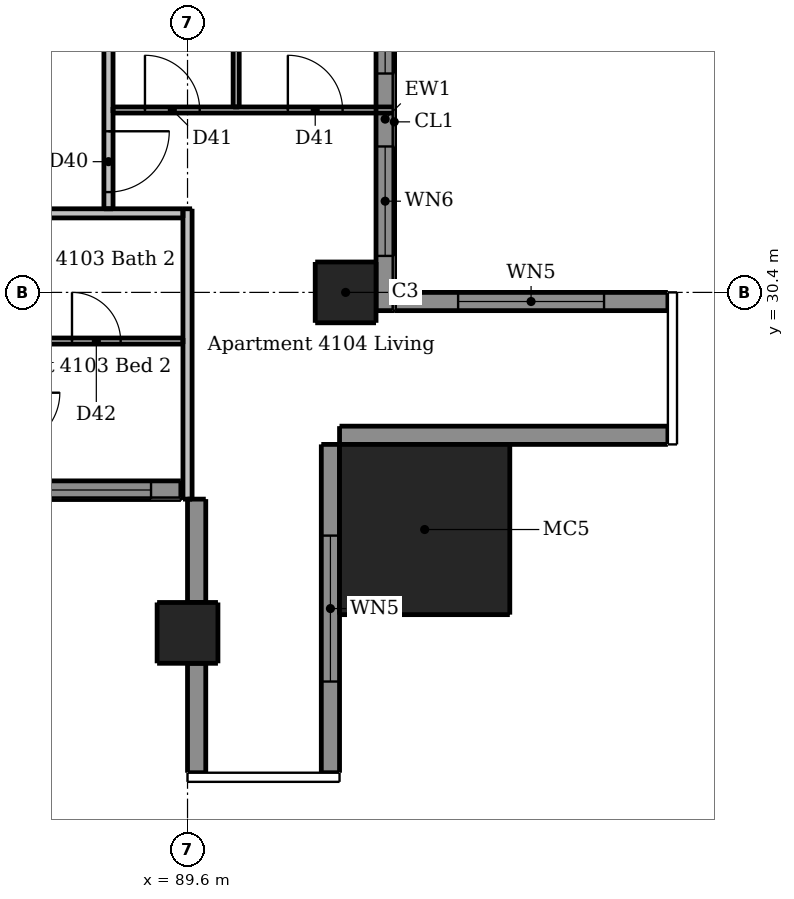
"""IFC4 building model, lengths in metres.
Left out: names, types, materials, properties, quantities, classifications, styles, units other than length and angle.
Written with IfcOpenShell. Run it as: python <this file> out.ifc"""

import sys

from ifc_helpers import new_model, si_unit, direction, frame, frame_2d, origin, origin_2d, place, context, subcontext, project, spatial, rectangle, extrude, element, fill, save


model = new_model("IFC4")
c1 = context("Model", 3, precision=1e-05, world=origin(), true_north=direction((0.0, 1.0)))
c2 = subcontext(c1, "Body", "Model", "MODEL_VIEW")
j1 = project(units=[si_unit("LENGTHUNIT", "METRE"), si_unit("PLANEANGLEUNIT", "RADIAN")], contexts=[c1])
p1 = place(None, origin())
s1 = spatial("IfcSite", under=j1, at=p1, CompositionType="ELEMENT")
p2 = place(p1, origin())
s2 = spatial("IfcBuilding", under=s1, at=p2, CompositionType="ELEMENT")
p3 = place(p2, frame((0.0, 0.0, 154.9)))
s3 = spatial("IfcBuildingStorey", under=s2, at=p3, CompositionType="ELEMENT", Elevation=154.9)
for number, where, z_axis, x_axis in (
    (1, (89.6, 24.8, 0.0), (0.0, 0.0, 1.0), (1.0, 0.0, 0.0)),
    (2, (92.2, 30.4, 0.0), (0.0, 0.0, 1.0), (1.0, 0.0, 0.0)),
):
    element("IfcColumn", number, at=place(p3, frame(where, z_axis=z_axis, x_axis=x_axis)), inside=s3, PredefinedType="COLUMN", context=c2, shape_type="SweptSolid", body=[
        extrude(rectangle(XDim=1.0, YDim=1.0, at=origin_2d()), origin(), (0.0, 0.0, 1.0), 3.05),
    ])
p4 = place(p3, frame((93.5, 26.5, 0.0), z_axis=(0.0, 0.0, 1.0), x_axis=(1.0, 0.0, 0.0)))
e3 = element("IfcColumn", 3, at=p4, inside=s3, PredefinedType="COLUMN", context=c2, shape_type="SweptSolid", body=[
    extrude(rectangle(XDim=2.8, YDim=2.8, at=origin_2d()), origin(), (0.0, 0.0, 1.0), 3.3),
])
p5 = place(p3, frame((89.75, 27.0, 0.0), z_axis=(0.0, 0.0, 1.0), x_axis=(0.0, -1.0, 0.0)))
e4 = element("IfcWall", 4, at=p5, inside=s3, PredefinedType="SOLIDWALL", context=c2, shape_type="SweptSolid", body=[
    extrude(rectangle(XDim=1.7, YDim=0.3, at=frame_2d((0.85, 0.0))), origin(), (0.0, 0.0, 1.0), 3.05),
])
p6 = place(p3, frame((89.75, 24.3, 0.0), z_axis=(0.0, 0.0, 1.0), x_axis=(0.0, -1.0, 0.0)))
e5 = element("IfcWall", 5, at=p6, inside=s3, PredefinedType="SOLIDWALL", context=c2, shape_type="SweptSolid", body=[
    extrude(rectangle(XDim=1.8, YDim=0.3, at=frame_2d((0.9, 0.0))), origin(), (0.0, 0.0, 1.0), 3.05),
])
p7 = place(p3, frame((91.95, 22.5, 0.0), z_axis=(0.0, 0.0, 1.0), x_axis=(0.0, 1.0, 0.0)))
e6 = element("IfcWall", 6, at=p7, inside=s3, PredefinedType="SOLIDWALL", context=c2, shape_type="SweptSolid", body=[
    extrude(rectangle(XDim=5.4, YDim=0.3, at=frame_2d((2.7, 0.0))), origin(), (0.0, 0.0, 1.0), 3.05),
])
p8 = place(p7, frame((1.5, 0.0, 0.15)))
e7 = element("IfcOpeningElement", 7, at=p8, cuts=e6, PredefinedType="OPENING", context=c2, shape_type="SweptSolid", body=[
    extrude(rectangle(XDim=2.4, YDim=2.1, at=frame_2d((1.2, 1.05))), frame((0.0, 0.16, 0.0), z_axis=(0.0, -1.0, 0.0), x_axis=(1.0, 0.0, 0.0)), (0.0, 0.0, 1.0), 0.32),
])
p9 = place(p3, frame((92.1, 28.05, 0.0), z_axis=(0.0, 0.0, 1.0), x_axis=(1.0, 0.0, 0.0)))
e8 = element("IfcWall", 8, at=p9, inside=s3, PredefinedType="SOLIDWALL", context=c2, shape_type="SweptSolid", body=[
    extrude(rectangle(XDim=5.4, YDim=0.3, at=frame_2d((2.7, 0.0))), origin(), (0.0, 0.0, 1.0), 3.05),
])
p10 = place(p3, frame((97.5, 30.25, 0.0), z_axis=(0.0, 0.0, 1.0), x_axis=(-1.0, 0.0, 0.0)))
e9 = element("IfcWall", 9, at=p10, inside=s3, PredefinedType="SOLIDWALL", context=c2, shape_type="SweptSolid", body=[
    extrude(rectangle(XDim=4.5, YDim=0.3, at=frame_2d((2.25, 0.0))), origin(), (0.0, 0.0, 1.0), 3.05),
])
p11 = place(p10, frame((1.05, 0.0, 0.15)))
e10 = element("IfcOpeningElement", 10, at=p11, cuts=e9, PredefinedType="OPENING", context=c2, shape_type="SweptSolid", body=[
    extrude(rectangle(XDim=2.4, YDim=2.1, at=frame_2d((1.2, 1.05))), frame((0.0, 0.16, 0.0), z_axis=(0.0, -1.0, 0.0), x_axis=(1.0, 0.0, 0.0)), (0.0, 0.0, 1.0), 0.32),
])
p12 = place(p3, frame((83.7, 27.15, 0.0), z_axis=(0.0, 0.0, 1.0), x_axis=(1.0, 0.0, 0.0)))
e11 = element("IfcWall", 11, at=p12, inside=s3, PredefinedType="SOLIDWALL", context=c2, shape_type="SweptSolid", body=[
    extrude(rectangle(XDim=5.79, YDim=0.3, at=frame_2d((2.895, 0.0))), origin(), (0.0, 0.0, 1.0), 3.05),
])
p13 = place(p12, frame((0.5, 0.0, 0.15)))
e12 = element("IfcOpeningElement", 12, at=p13, cuts=e11, PredefinedType="OPENING", context=c2, shape_type="SweptSolid", body=[
    extrude(rectangle(XDim=1.8, YDim=2.1, at=frame_2d((0.9, 1.05))), frame((0.0, 0.16, 0.0), z_axis=(0.0, -1.0, 0.0), x_axis=(1.0, 0.0, 0.0)), (0.0, 0.0, 1.0), 0.32),
])
p14 = place(p12, frame((3.5, 0.0, 0.15)))
e13 = element("IfcOpeningElement", 13, at=p14, cuts=e11, PredefinedType="OPENING", context=c2, shape_type="SweptSolid", body=[
    extrude(rectangle(XDim=1.8, YDim=2.1, at=frame_2d((0.9, 1.05))), frame((0.0, 0.16, 0.0), z_axis=(0.0, -1.0, 0.0), x_axis=(1.0, 0.0, 0.0)), (0.0, 0.0, 1.0), 0.32),
])
p15 = place(p3, frame((92.85, 30.1, 0.0), z_axis=(0.0, 0.0, 1.0), x_axis=(0.0, 1.0, 0.0)))
e14 = element("IfcWall", 14, at=p15, inside=s3, PredefinedType="SOLIDWALL", context=c2, shape_type="SweptSolid", body=[
    extrude(rectangle(XDim=6.3, YDim=0.3, at=frame_2d((3.15, 0.0))), origin(), (0.0, 0.0, 1.0), 3.05),
])
p16 = place(p15, frame((0.9, 0.0, 0.15)))
e15 = element("IfcOpeningElement", 15, at=p16, cuts=e14, PredefinedType="OPENING", context=c2, shape_type="SweptSolid", body=[
    extrude(rectangle(XDim=1.8, YDim=2.1, at=frame_2d((0.9, 1.05))), frame((0.0, 0.16, 0.0), z_axis=(0.0, -1.0, 0.0), x_axis=(1.0, 0.0, 0.0)), (0.0, 0.0, 1.0), 0.32),
])
p17 = place(p15, frame((3.9, 0.0, 0.15)))
e16 = element("IfcOpeningElement", 16, at=p17, cuts=e14, PredefinedType="OPENING", context=c2, shape_type="SweptSolid", body=[
    extrude(rectangle(XDim=1.8, YDim=2.1, at=frame_2d((0.9, 1.05))), frame((0.0, 0.16, 0.0), z_axis=(0.0, -1.0, 0.0), x_axis=(1.0, 0.0, 0.0)), (0.0, 0.0, 1.0), 0.32),
])
p18 = place(p3, frame((90.4, 33.45, 0.0), z_axis=(0.0, 0.0, 1.0), x_axis=(0.0, 1.0, 0.0)))
e17 = element("IfcWall", 17, at=p18, inside=s3, PredefinedType="PARTITIONING", context=c2, shape_type="SweptSolid", body=[
    extrude(rectangle(XDim=8.1, YDim=0.1, at=frame_2d((4.05, 0.0))), origin(), (0.0, 0.0, 1.0), 3.05),
])
p19 = place(p18, frame((3.75, 0.0, 0.0)))
e18 = element("IfcOpeningElement", 18, at=p19, cuts=e17, PredefinedType="OPENING", context=c2, shape_type="SweptSolid", body=[
    extrude(rectangle(XDim=0.8, YDim=2.1, at=frame_2d((0.4, 1.05))), frame((0.0, 0.06, 0.0), z_axis=(0.0, -1.0, 0.0), x_axis=(1.0, 0.0, 0.0)), (0.0, 0.0, 1.0), 0.12),
])
p20 = place(p18, frame((6.55, 0.0, 0.0)))
e19 = element("IfcOpeningElement", 19, at=p20, cuts=e17, PredefinedType="OPENING", context=c2, shape_type="SweptSolid", body=[
    extrude(rectangle(XDim=0.9, YDim=2.1, at=frame_2d((0.45, 1.05))), frame((0.0, 0.06, 0.0), z_axis=(0.0, -1.0, 0.0), x_axis=(1.0, 0.0, 0.0)), (0.0, 0.0, 1.0), 0.12),
])
p21 = place(p3, frame((88.375, 33.4, 0.0), z_axis=(0.0, 0.0, 1.0), x_axis=(1.0, 0.0, 0.0)))
e20 = element("IfcWall", 20, at=p21, inside=s3, PredefinedType="PARTITIONING", context=c2, shape_type="SweptSolid", body=[
    extrude(rectangle(XDim=4.625, YDim=0.1, at=frame_2d((2.312, 0.0))), origin(), (0.0, 0.0, 1.0), 3.05),
])
p22 = place(p21, frame((0.525, 0.0, 0.0)))
e21 = element("IfcOpeningElement", 21, at=p22, cuts=e20, PredefinedType="OPENING", context=c2, shape_type="SweptSolid", body=[
    extrude(rectangle(XDim=0.9, YDim=2.1, at=frame_2d((0.45, 1.05))), frame((0.0, 0.06, 0.0), z_axis=(0.0, -1.0, 0.0), x_axis=(1.0, 0.0, 0.0)), (0.0, 0.0, 1.0), 0.12),
])
p23 = place(p21, frame((2.875, 0.0, 0.0)))
e22 = element("IfcOpeningElement", 22, at=p23, cuts=e20, PredefinedType="OPENING", context=c2, shape_type="SweptSolid", body=[
    extrude(rectangle(XDim=0.9, YDim=2.1, at=frame_2d((0.45, 1.05))), frame((0.0, 0.06, 0.0), z_axis=(0.0, -1.0, 0.0), x_axis=(1.0, 0.0, 0.0)), (0.0, 0.0, 1.0), 0.12),
])
p24 = place(p3, frame((84.25, 29.6, 0.0), z_axis=(0.0, 0.0, 1.0), x_axis=(1.0, 0.0, 0.0)))
e23 = element("IfcWall", 23, at=p24, inside=s3, PredefinedType="PARTITIONING", context=c2, shape_type="SweptSolid", body=[
    extrude(rectangle(XDim=5.275, YDim=0.1, at=frame_2d((2.637, 0.0))), origin(), (0.0, 0.0, 1.0), 3.05),
])
p25 = place(p24, frame((0.7, 0.0, 0.0)))
e24 = element("IfcOpeningElement", 24, at=p25, cuts=e23, PredefinedType="OPENING", context=c2, shape_type="SweptSolid", body=[
    extrude(rectangle(XDim=0.9, YDim=2.1, at=frame_2d((0.45, 1.05))), frame((0.0, 0.06, 0.0), z_axis=(0.0, -1.0, 0.0), x_axis=(1.0, 0.0, 0.0)), (0.0, 0.0, 1.0), 0.12),
])
p26 = place(p24, frame((3.45, 0.0, 0.0)))
e25 = element("IfcOpeningElement", 25, at=p26, cuts=e23, PredefinedType="OPENING", context=c2, shape_type="SweptSolid", body=[
    extrude(rectangle(XDim=0.8, YDim=2.1, at=frame_2d((0.4, 1.05))), frame((0.0, 0.06, 0.0), z_axis=(0.0, -1.0, 0.0), x_axis=(1.0, 0.0, 0.0)), (0.0, 0.0, 1.0), 0.12),
])
p27 = place(p3, frame((88.3, 61.175, 0.0), z_axis=(0.0, 0.0, 1.0), x_axis=(0.0, -1.0, 0.0)))
e26 = element("IfcWall", 26, at=p27, inside=s3, PredefinedType="PARTITIONING", context=c2, shape_type="SweptSolid", body=[
    extrude(rectangle(XDim=29.4, YDim=0.15, at=frame_2d((14.7, 0.0))), origin(), (0.0, 0.0, 1.0), 3.05),
])
p28 = place(p27, frame((28.125, 0.0, 0.0)))
e27 = element("IfcOpeningElement", 27, at=p28, cuts=e26, PredefinedType="OPENING", context=c2, shape_type="SweptSolid", body=[
    extrude(rectangle(XDim=1.0, YDim=2.1, at=frame_2d((0.5, 1.05))), frame((0.0, 0.085, 0.0), z_axis=(0.0, -1.0, 0.0), x_axis=(1.0, 0.0, 0.0)), (0.0, 0.0, 1.0), 0.17),
])
p29 = place(p27, frame((18.275, 0.0, 0.0)))
e28 = element("IfcOpeningElement", 28, at=p29, cuts=e26, PredefinedType="OPENING", context=c2, shape_type="SweptSolid", body=[
    extrude(rectangle(XDim=1.0, YDim=2.1, at=frame_2d((0.5, 1.05))), frame((0.0, 0.085, 0.0), z_axis=(0.0, -1.0, 0.0), x_axis=(1.0, 0.0, 0.0)), (0.0, 0.0, 1.0), 0.17),
])
p30 = place(p27, frame((10.475, 0.0, 0.0)))
e29 = element("IfcOpeningElement", 29, at=p30, cuts=e26, PredefinedType="OPENING", context=c2, shape_type="SweptSolid", body=[
    extrude(rectangle(XDim=1.0, YDim=2.1, at=frame_2d((0.5, 1.05))), frame((0.0, 0.085, 0.0), z_axis=(0.0, -1.0, 0.0), x_axis=(1.0, 0.0, 0.0)), (0.0, 0.0, 1.0), 0.17),
])
p31 = place(p27, frame((3.275, 0.0, 0.0)))
e30 = element("IfcOpeningElement", 30, at=p31, cuts=e26, PredefinedType="OPENING", context=c2, shape_type="SweptSolid", body=[
    extrude(rectangle(XDim=1.0, YDim=2.1, at=frame_2d((0.5, 1.05))), frame((0.0, 0.085, 0.0), z_axis=(0.0, -1.0, 0.0), x_axis=(1.0, 0.0, 0.0)), (0.0, 0.0, 1.0), 0.17),
])
p32 = place(p3, frame((89.6, 27.0, 0.0), z_axis=(0.0, 0.0, 1.0), x_axis=(0.0, 1.0, 0.0)))
e31 = element("IfcWall", 31, at=p32, inside=s3, PredefinedType="PARTITIONING", context=c2, shape_type="SweptSolid", body=[
    extrude(rectangle(XDim=4.775, YDim=0.15, at=frame_2d((2.387, 0.0))), origin(), (0.0, 0.0, 1.0), 2.51),
])
p33 = place(p3, frame((89.525, 31.7, 0.0), z_axis=(0.0, 0.0, 1.0), x_axis=(-1.0, 0.0, 0.0)))
e32 = element("IfcWall", 32, at=p33, inside=s3, PredefinedType="PARTITIONING", context=c2, shape_type="SweptSolid", body=[
    extrude(rectangle(XDim=30.55, YDim=0.15, at=frame_2d((15.275, 0.0))), origin(), (0.0, 0.0, 1.0), 3.05),
])
p34 = place(p33, frame((26.775, 0.0, 0.0)))
e33 = element("IfcOpeningElement", 33, at=p34, cuts=e32, PredefinedType="OPENING", context=c2, shape_type="SweptSolid", body=[
    extrude(rectangle(XDim=1.0, YDim=2.1, at=frame_2d((0.5, 1.05))), frame((0.0, 0.085, 0.0), z_axis=(0.0, -1.0, 0.0), x_axis=(1.0, 0.0, 0.0)), (0.0, 0.0, 1.0), 0.17),
])
p35 = place(p33, frame((14.425, 0.0, 0.0)))
e34 = element("IfcOpeningElement", 34, at=p35, cuts=e32, PredefinedType="OPENING", context=c2, shape_type="SweptSolid", body=[
    extrude(rectangle(XDim=1.0, YDim=2.1, at=frame_2d((0.5, 1.05))), frame((0.0, 0.085, 0.0), z_axis=(0.0, -1.0, 0.0), x_axis=(1.0, 0.0, 0.0)), (0.0, 0.0, 1.0), 0.17),
])
p36 = place(p33, frame((6.575, 0.0, 0.0)))
e35 = element("IfcOpeningElement", 35, at=p36, cuts=e32, PredefinedType="OPENING", context=c2, shape_type="SweptSolid", body=[
    extrude(rectangle(XDim=1.0, YDim=2.1, at=frame_2d((0.5, 1.05))), frame((0.0, 0.085, 0.0), z_axis=(0.0, -1.0, 0.0), x_axis=(1.0, 0.0, 0.0)), (0.0, 0.0, 1.0), 0.17),
])
p37 = place(p8, origin())
e36 = element("IfcWindow", 36, at=p37, inside=s3, PartitioningType="DOUBLE_PANEL_VERTICAL", PredefinedType="WINDOW", context=c2, shape_type="SweptSolid", body=[
    extrude(rectangle(XDim=2.4, YDim=2.1, at=frame_2d((1.2, 1.05))), frame((0.0, 0.03, 0.0), z_axis=(0.0, -1.0, 0.0), x_axis=(1.0, 0.0, 0.0)), (0.0, 0.0, 1.0), 0.06),
])
fill(e7, e36)
p38 = place(p11, origin())
e37 = element("IfcWindow", 37, at=p38, inside=s3, PartitioningType="DOUBLE_PANEL_VERTICAL", PredefinedType="WINDOW", context=c2, shape_type="SweptSolid", body=[
    extrude(rectangle(XDim=2.4, YDim=2.1, at=frame_2d((1.2, 1.05))), frame((0.0, 0.03, 0.0), z_axis=(0.0, -1.0, 0.0), x_axis=(1.0, 0.0, 0.0)), (0.0, 0.0, 1.0), 0.06),
])
fill(e10, e37)
p39 = place(p14, origin())
e38 = element("IfcWindow", 38, at=p39, inside=s3, PartitioningType="DOUBLE_PANEL_VERTICAL", PredefinedType="WINDOW", context=c2, shape_type="SweptSolid", body=[
    extrude(rectangle(XDim=1.8, YDim=2.1, at=frame_2d((0.9, 1.05))), frame((0.0, 0.03, 0.0), z_axis=(0.0, -1.0, 0.0), x_axis=(1.0, 0.0, 0.0)), (0.0, 0.0, 1.0), 0.06),
])
fill(e13, e38)
p40 = place(p16, origin())
e39 = element("IfcWindow", 39, at=p40, inside=s3, PartitioningType="DOUBLE_PANEL_VERTICAL", PredefinedType="WINDOW", context=c2, shape_type="SweptSolid", body=[
    extrude(rectangle(XDim=1.8, YDim=2.1, at=frame_2d((0.9, 1.05))), frame((0.0, 0.03, 0.0), z_axis=(0.0, -1.0, 0.0), x_axis=(1.0, 0.0, 0.0)), (0.0, 0.0, 1.0), 0.06),
])
fill(e15, e39)
p41 = place(p17, origin())
e40 = element("IfcWindow", 40, at=p41, inside=s3, PartitioningType="DOUBLE_PANEL_VERTICAL", PredefinedType="WINDOW", context=c2, shape_type="SweptSolid", body=[
    extrude(rectangle(XDim=1.8, YDim=2.1, at=frame_2d((0.9, 1.05))), frame((0.0, 0.03, 0.0), z_axis=(0.0, -1.0, 0.0), x_axis=(1.0, 0.0, 0.0)), (0.0, 0.0, 1.0), 0.06),
])
fill(e16, e40)
p42 = place(p26, origin())
e41 = element("IfcDoor", 41, at=p42, inside=s3, OperationType="SINGLE_SWING_LEFT", PredefinedType="DOOR", context=c2, shape_type="SweptSolid", body=[
    extrude(rectangle(XDim=0.8, YDim=2.1, at=frame_2d((0.4, 1.05))), frame((0.0, 0.025, 0.0), z_axis=(0.0, -1.0, 0.0), x_axis=(1.0, 0.0, 0.0)), (0.0, 0.0, 1.0), 0.05),
])
fill(e25, e41)
p43 = place(p28, origin())
e42 = element("IfcDoor", 42, at=p43, inside=s3, OperationType="SINGLE_SWING_LEFT", PredefinedType="DOOR", context=c2, shape_type="SweptSolid", body=[
    extrude(rectangle(XDim=1.0, YDim=2.1, at=frame_2d((0.5, 1.05))), frame((0.0, 0.025, 0.0), z_axis=(0.0, -1.0, 0.0), x_axis=(1.0, 0.0, 0.0)), (0.0, 0.0, 1.0), 0.05),
])
fill(e27, e42)
p44 = place(p22, origin())
e43 = element("IfcDoor", 43, at=p44, inside=s3, OperationType="SINGLE_SWING_LEFT", PredefinedType="DOOR", context=c2, shape_type="SweptSolid", body=[
    extrude(rectangle(XDim=0.9, YDim=2.1, at=frame_2d((0.45, 1.05))), frame((0.0, 0.025, 0.0), z_axis=(0.0, -1.0, 0.0), x_axis=(1.0, 0.0, 0.0)), (0.0, 0.0, 1.0), 0.05),
])
fill(e21, e43)
p45 = place(p23, origin())
e44 = element("IfcDoor", 44, at=p45, inside=s3, OperationType="SINGLE_SWING_LEFT", PredefinedType="DOOR", context=c2, shape_type="SweptSolid", body=[
    extrude(rectangle(XDim=0.9, YDim=2.1, at=frame_2d((0.45, 1.05))), frame((0.0, 0.025, 0.0), z_axis=(0.0, -1.0, 0.0), x_axis=(1.0, 0.0, 0.0)), (0.0, 0.0, 1.0), 0.05),
])
fill(e22, e44)
save(model, sys.argv[1])
